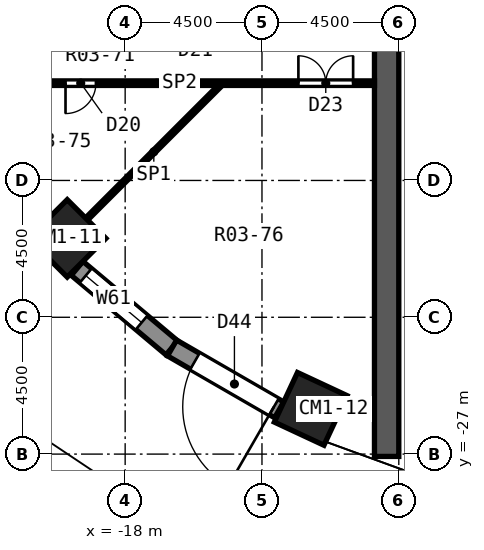
"""IFC4 building model, lengths in metres.
Left out: names, types, materials, properties, quantities, classifications, styles, units other than length and angle.
Written with IfcOpenShell. Run it as: python <this file> out.ifc"""

import sys

from ifc_helpers import new_model, si_unit, direction, frame, frame_2d, origin, origin_2d, place, context, subcontext, project, spatial, polyline, rectangle, outline, extrude, element, fill, save


model = new_model("IFC4")
c1 = context("Model", 3, precision=1e-05, world=origin(), true_north=direction((0.0, 1.0)))
c2 = subcontext(c1, "Body", "Model", "MODEL_VIEW")
j1 = project(units=[si_unit("LENGTHUNIT", "METRE"), si_unit("PLANEANGLEUNIT", "RADIAN")], contexts=[c1])
p1 = place(None, origin())
s1 = spatial("IfcSite", under=j1, at=p1, CompositionType="ELEMENT")
p2 = place(p1, origin())
s2 = spatial("IfcBuilding", under=s1, at=p2, CompositionType="ELEMENT")
p3 = place(p2, origin())
s3 = spatial("IfcBuildingStorey", under=s2, at=p3, CompositionType="ELEMENT", Elevation=0.0)
for number, where, z_axis, x_axis in (
    (1, (-19.905, -19.905, 0.0), (0.0, 0.0, 1.0), (-0.707, -0.707, 0.0)),
    (2, (-11.897, -25.512, 0.0), (0.0, 0.0, 1.0), (-0.423, -0.906, 0.0)),
):
    element("IfcColumn", number, at=place(p3, frame(where, z_axis=z_axis, x_axis=x_axis)), inside=s3, PredefinedType="COLUMN", context=c2, shape_type="SweptSolid", body=[
        extrude(rectangle(XDim=1.8, YDim=1.8, at=origin_2d()), origin(), (0.0, 0.0, 1.0), 5.0),
    ])
p4 = place(p3, frame((-9.4, -27.077, 0.0), z_axis=(0.0, 0.0, 1.0), x_axis=(0.0, 1.0, 0.0)))
e3 = element("IfcWall", 3, at=p4, inside=s3, PredefinedType="SHEAR", context=c2, shape_type="SweptSolid", body=[
    extrude(rectangle(XDim=54.154, YDim=0.8, at=frame_2d((27.077, 0.0))), origin(), (0.0, 0.0, 1.0), 5.0),
])
p5 = place(p4, frame((17.377, 0.0, 0.0)))
e4 = element("IfcOpeningElement", 4, at=p5, cuts=e3, PredefinedType="OPENING", context=c2, shape_type="SweptSolid", body=[
    extrude(rectangle(XDim=1.4, YDim=2.1, at=frame_2d((0.7, 1.05))), frame((0.0, 0.412, 0.0), z_axis=(0.0, -1.0, 0.0), x_axis=(1.0, 0.0, 0.0)), (0.0, 0.0, 1.0), 0.824),
])
p6 = place(p4, frame((21.777, 0.0, 0.3)))
e5 = element("IfcOpeningElement", 5, at=p6, cuts=e3, PredefinedType="OPENING", context=c2, shape_type="SweptSolid", body=[
    extrude(rectangle(XDim=2.4, YDim=2.1, at=frame_2d((1.2, 1.05))), frame((0.0, 0.412, 0.0), z_axis=(0.0, -1.0, 0.0), x_axis=(1.0, 0.0, 0.0)), (0.0, 0.0, 1.0), 0.824),
])
p7 = place(p4, frame((24.377, 0.0, 0.0)))
e6 = element("IfcOpeningElement", 6, at=p7, cuts=e3, PredefinedType="OPENING", context=c2, shape_type="SweptSolid", body=[
    extrude(rectangle(XDim=1.4, YDim=2.1, at=frame_2d((0.7, 1.05))), frame((0.0, 0.412, 0.0), z_axis=(0.0, -1.0, 0.0), x_axis=(1.0, 0.0, 0.0)), (0.0, 0.0, 1.0), 0.824),
])
p8 = place(p4, frame((28.477, 0.0, 0.3)))
e7 = element("IfcOpeningElement", 7, at=p8, cuts=e3, PredefinedType="OPENING", context=c2, shape_type="SweptSolid", body=[
    extrude(rectangle(XDim=2.4, YDim=2.1, at=frame_2d((1.2, 1.05))), frame((0.0, 0.412, 0.0), z_axis=(0.0, -1.0, 0.0), x_axis=(1.0, 0.0, 0.0)), (0.0, 0.0, 1.0), 0.824),
])
p9 = place(p4, frame((33.877, 0.0, 0.0)))
e8 = element("IfcOpeningElement", 8, at=p9, cuts=e3, PredefinedType="OPENING", context=c2, shape_type="SweptSolid", body=[
    extrude(rectangle(XDim=1.4, YDim=2.1, at=frame_2d((0.7, 1.05))), frame((0.0, 0.412, 0.0), z_axis=(0.0, -1.0, 0.0), x_axis=(1.0, 0.0, 0.0)), (0.0, 0.0, 1.0), 0.824),
])
p10 = place(p4, frame((37.877, 0.0, 0.3)))
e9 = element("IfcOpeningElement", 9, at=p10, cuts=e3, PredefinedType="OPENING", context=c2, shape_type="SweptSolid", body=[
    extrude(rectangle(XDim=2.4, YDim=2.1, at=frame_2d((1.2, 1.05))), frame((0.0, 0.412, 0.0), z_axis=(0.0, -1.0, 0.0), x_axis=(1.0, 0.0, 0.0)), (0.0, 0.0, 1.0), 0.824),
])
p11 = place(p3, frame((-19.581, -20.891, 0.0), z_axis=(0.0, 0.0, 1.0), x_axis=(0.766033337734, -0.642800844336, 0.0)))
e10 = element("IfcWall", 10, at=p11, inside=s3, PredefinedType="SOLIDWALL", context=c2, shape_type="SweptSolid", body=[
    extrude(rectangle(XDim=4.069, YDim=0.6, at=frame_2d((2.035, 0.0))), origin(), (0.0, 0.0, 1.0), 4.45),
])
p12 = place(p11, frame((0.372, 0.0, 0.3)))
e11 = element("IfcOpeningElement", 11, at=p12, cuts=e10, PredefinedType="OPENING", context=c2, shape_type="SweptSolid", body=[
    extrude(rectangle(XDim=2.4, YDim=2.1, at=frame_2d((1.2, 1.05))), frame((0.0, 0.312, 0.0), z_axis=(0.0, -1.0, 0.0), x_axis=(1.0, 0.0, 0.0)), (0.0, 0.0, 1.0), 0.624),
])
p13 = place(p3, frame((-16.458, -23.51, 0.0), z_axis=(0.0, 0.0, 1.0), x_axis=(0.866011732453, -0.500023678693, 0.0)))
e12 = element("IfcWall", 12, at=p13, inside=s3, PredefinedType="SOLIDWALL", context=c2, shape_type="SweptSolid", body=[
    extrude(rectangle(XDim=4.069, YDim=0.6, at=frame_2d((2.035, 0.0))), origin(), (0.0, 0.0, 1.0), 4.45),
])
p14 = place(p13, frame((0.869, 0.0, 0.0)))
e13 = element("IfcOpeningElement", 13, at=p14, cuts=e12, PredefinedType="OPENING", context=c2, shape_type="SweptSolid", body=[
    extrude(rectangle(XDim=3.0, YDim=4.5, at=frame_2d((1.5, 2.25))), frame((0.0, 0.312, 0.0), z_axis=(0.0, -1.0, 0.0), x_axis=(1.0, 0.0, 0.0)), (0.0, 0.0, 1.0), 0.624),
])
p15 = place(p3, frame((-11.641, -26.507, 0.0), z_axis=(-0.342028363555, -0.939687527149, 0.001987421433), x_axis=(0.00066157174, 0.001874177487, 0.999998024889)))
e14 = element("IfcWall", 14, at=p15, inside=s3, PredefinedType="SOLIDWALL", context=c2, shape_type="SweptSolid", body=[
    extrude(outline(polyline([(0.0, 0.0), (4.45, -5.421e-19), (4.45, -2.81), (-5.446e-05, -2.81), (0.0, 0.0)])), origin(), (0.0, 0.0, -1.0), 0.38),
])
p16 = place(p3, frame((-24.121, -14.8, 0.0), z_axis=(0.0, 0.0, 1.0), x_axis=(1.0, 0.0, 0.0)))
e15 = element("IfcWall", 15, at=p16, inside=s3, PredefinedType="PARTITIONING", context=c2, shape_type="SweptSolid", body=[
    extrude(rectangle(XDim=14.321, YDim=0.15, at=frame_2d((7.161, 0.0))), origin(), (0.0, 0.0, 1.0), 4.45),
])
p17 = place(p16, frame((4.159, 0.0, 0.0)))
e16 = element("IfcOpeningElement", 16, at=p17, cuts=e15, PredefinedType="OPENING", context=c2, shape_type="SweptSolid", body=[
    extrude(rectangle(XDim=1.0, YDim=2.1, at=frame_2d((0.5, 1.05))), frame((0.0, 0.087, 0.0), z_axis=(0.0, -1.0, 0.0), x_axis=(1.0, 0.0, 0.0)), (0.0, 0.0, 1.0), 0.174),
])
p18 = place(p16, frame((11.819, 0.0, 0.0)))
e17 = element("IfcOpeningElement", 17, at=p18, cuts=e15, PredefinedType="OPENING", context=c2, shape_type="SweptSolid", body=[
    extrude(rectangle(XDim=1.8, YDim=2.1, at=frame_2d((0.9, 1.05))), frame((0.0, 0.087, 0.0), z_axis=(0.0, -1.0, 0.0), x_axis=(1.0, 0.0, 0.0)), (0.0, 0.0, 1.0), 0.174),
])
p19 = place(p3, frame((-19.262, -19.262, 0.0), z_axis=(0.0, 0.0, 1.0), x_axis=(0.707106781187, 0.707106781187, 0.0)))
e18 = element("IfcWall", 18, at=p19, inside=s3, PredefinedType="PARTITIONING", context=c2, shape_type="SweptSolid", body=[
    extrude(rectangle(XDim=6.235, YDim=0.1, at=frame_2d((3.117, 0.0))), origin(), (0.0, 0.0, 1.0), 4.45),
])
p20 = place(p17, frame((1.0, 0.0, 0.0), z_axis=(0.0, 0.0, 1.0), x_axis=(-1.0, 0.0, 0.0)))
e19 = element("IfcDoor", 19, at=p20, inside=s3, OperationType="SINGLE_SWING_RIGHT", PredefinedType="DOOR", context=c2, shape_type="SweptSolid", body=[
    extrude(rectangle(XDim=1.0, YDim=2.1, at=frame_2d((0.5, 1.05))), frame((0.0, 0.025, 0.0), z_axis=(0.0, -1.0, 0.0), x_axis=(1.0, 0.0, 0.0)), (0.0, 0.0, 1.0), 0.05),
])
fill(e16, e19)
p21 = place(p18, origin())
e20 = element("IfcDoor", 20, at=p21, inside=s3, OperationType="DOUBLE_DOOR_SINGLE_SWING", PredefinedType="DOOR", context=c2, shape_type="SweptSolid", body=[
    extrude(rectangle(XDim=1.8, YDim=2.1, at=frame_2d((0.9, 1.05))), frame((0.0, 0.025, 0.0), z_axis=(0.0, -1.0, 0.0), x_axis=(1.0, 0.0, 0.0)), (0.0, 0.0, 1.0), 0.05),
])
fill(e17, e20)
p22 = place(p14, frame((3.0, 0.0, 0.0), z_axis=(0.0, 0.0, 1.0), x_axis=(-1.0, 0.0, 0.0)))
e21 = element("IfcDoor", 21, at=p22, inside=s3, OperationType="SINGLE_SWING_LEFT", PredefinedType="DOOR", context=c2, shape_type="SweptSolid", body=[
    extrude(rectangle(XDim=3.0, YDim=4.5, at=frame_2d((1.5, 2.25))), frame((0.0, 0.025, 0.0), z_axis=(0.0, -1.0, 0.0), x_axis=(1.0, 0.0, 0.0)), (0.0, 0.0, 1.0), 0.05),
])
fill(e13, e21)
p23 = place(p12, origin())
e22 = element("IfcWindow", 22, at=p23, inside=s3, PartitioningType="SINGLE_PANEL", PredefinedType="WINDOW", context=c2, shape_type="SweptSolid", body=[
    extrude(rectangle(XDim=2.4, YDim=2.1, at=frame_2d((1.2, 1.05))), frame((0.0, 0.03, 0.0), z_axis=(0.0, -1.0, 0.0), x_axis=(1.0, 0.0, 0.0)), (0.0, 0.0, 1.0), 0.06),
])
fill(e11, e22)
save(model, sys.argv[1])
